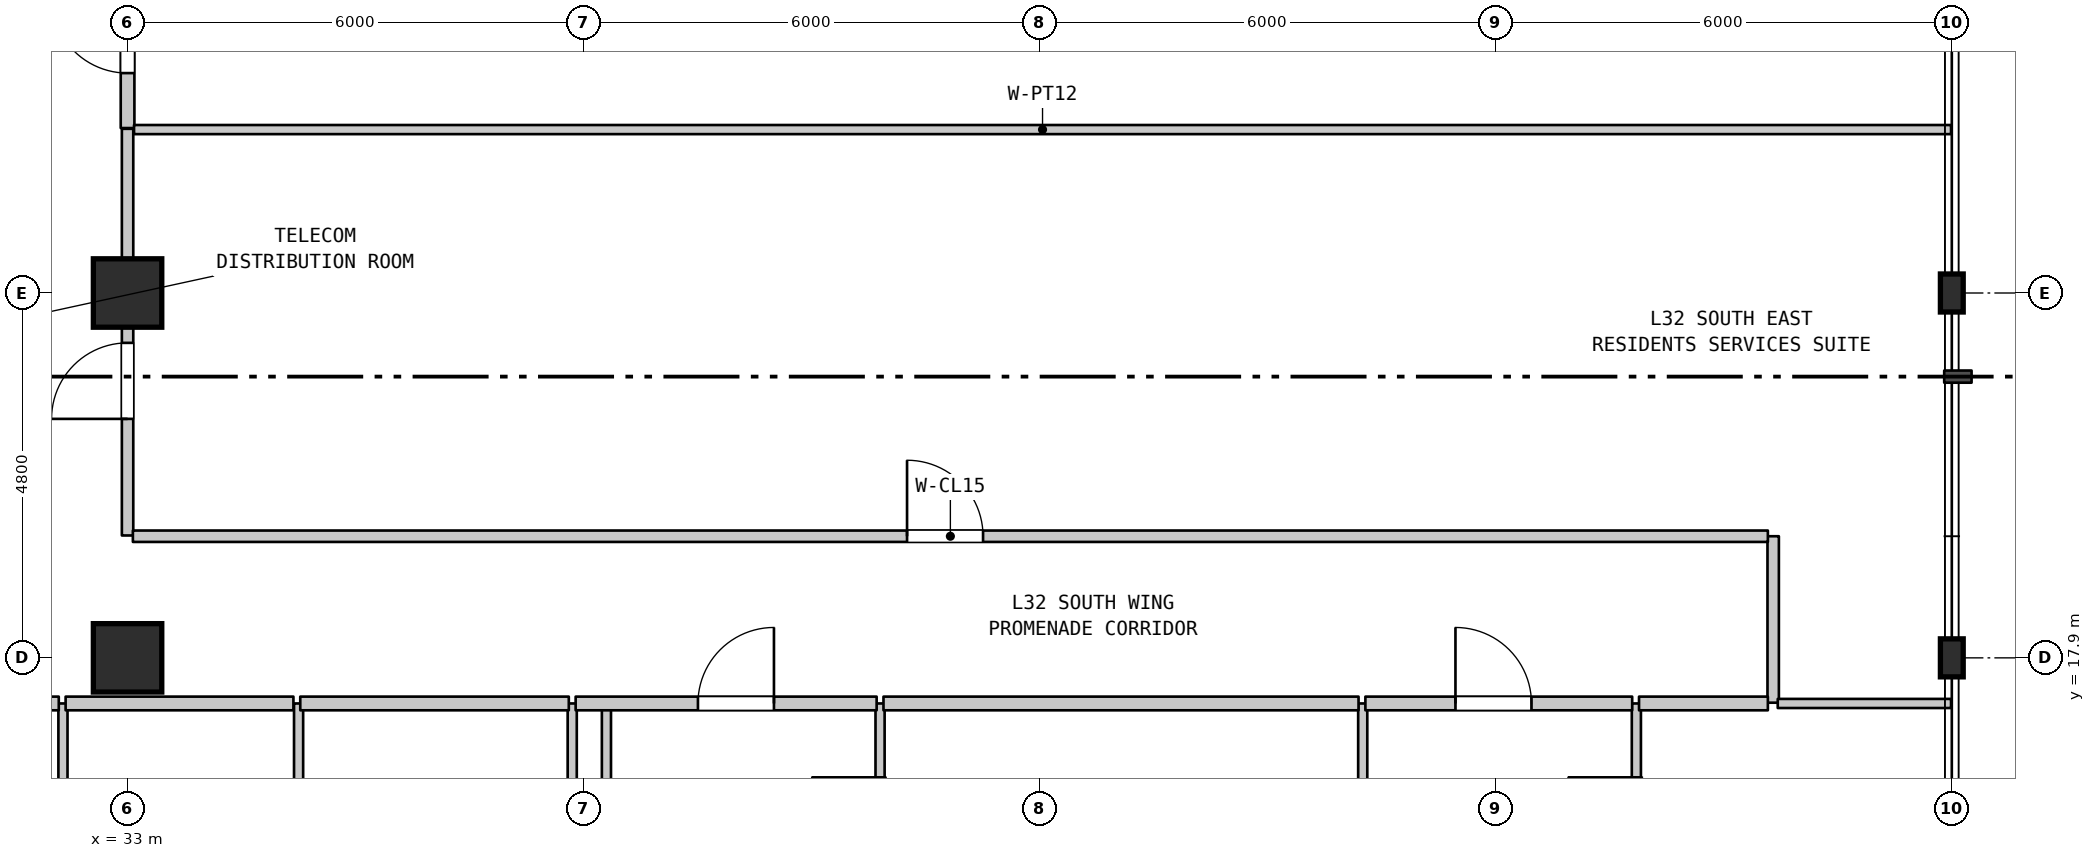
"""IFC4 building model, lengths in metres.
Left out: names, types, materials, properties, quantities, classifications, styles, units other than length and angle.
Written with IfcOpenShell. Run it as: python <this file> out.ifc"""

import sys

from ifc_helpers import new_model, si_unit, direction, frame, frame_2d, origin, origin_2d, place, context, subcontext, project, spatial, rectangle, i_section, extrude, element, fill, save


model = new_model("IFC4")
c1 = context("Model", 3, precision=1e-05, world=origin(), true_north=direction((0.0, 1.0)))
c2 = subcontext(c1, "Body", "Model", "MODEL_VIEW")
j1 = project(units=[si_unit("LENGTHUNIT", "METRE"), si_unit("PLANEANGLEUNIT", "RADIAN")], contexts=[c1])
p1 = place(None, origin())
s1 = spatial("IfcSite", under=j1, at=p1, CompositionType="ELEMENT")
p2 = place(p1, origin())
s2 = spatial("IfcBuilding", under=s1, at=p2, CompositionType="ELEMENT")
p3 = place(p2, frame((0.0, 0.0, 133.5)))
s3 = spatial("IfcBuildingStorey", under=s2, at=p3, CompositionType="ELEMENT", Elevation=133.5)
for number, where, z_axis, x_axis in (
    (1, (33.0, 17.9, 0.0), (0.0, 0.0, 1.0), (1.0, 0.0, 0.0)),
    (2, (33.0, 22.7, 0.0), (0.0, 0.0, 1.0), (1.0, 0.0, 0.0)),
):
    element("IfcColumn", number, at=place(p3, frame(where, z_axis=z_axis, x_axis=x_axis)), inside=s3, PredefinedType="COLUMN", context=c2, shape_type="SweptSolid", body=[
        extrude(rectangle(XDim=0.9, YDim=0.9, at=origin_2d()), origin(), (0.0, 0.0, 1.0), 3.7),
    ])
for number, where, z_axis, x_axis in (
    (3, (57.0, 17.9, 0.0), (0.0, 0.0, 1.0), (1.0, 0.0, 0.0)),
    (4, (57.0, 22.7, 0.0), (0.0, 0.0, 1.0), (1.0, 0.0, 0.0)),
):
    element("IfcColumn", number, at=place(p3, frame(where, z_axis=z_axis, x_axis=x_axis)), inside=s3, PredefinedType="COLUMN", context=c2, shape_type="SweptSolid", body=[
        extrude(i_section(OverallWidth=0.3, OverallDepth=0.5, WebThickness=0.014, FlangeThickness=0.028, FilletRadius=0.027, at=origin_2d()), origin(), (0.0, 0.0, 1.0), 3.7),
    ])
p4 = place(p3, frame((32.15, 11.15, 0.0), z_axis=(0.0, 0.0, 1.0), x_axis=(0.0, 1.0, 0.0)))
e5 = element("IfcWall", 5, at=p4, inside=s3, PredefinedType="PARTITIONING", context=c2, shape_type="SweptSolid", body=[
    extrude(rectangle(XDim=6.15, YDim=0.12, at=frame_2d((3.075, 0.0))), origin(), (0.0, 0.0, 1.0), 3.385),
])
p5 = place(p3, frame((33.0, 19.51, 0.0), z_axis=(0.0, 0.0, 1.0), x_axis=(0.0, 1.0, 0.0)))
e6 = element("IfcWall", 6, at=p5, inside=s3, PredefinedType="STANDARD", context=c2, shape_type="SweptSolid", body=[
    extrude(rectangle(XDim=5.35, YDim=0.15, at=frame_2d((2.675, 0.0))), origin(), (0.0, 0.0, 1.0), 2.935),
])
p6 = place(p5, frame((1.534, 0.0, 0.0)))
e7 = element("IfcOpeningElement", 7, at=p6, cuts=e6, PredefinedType="OPENING", context=c2, shape_type="SweptSolid", body=[
    extrude(rectangle(XDim=1.0, YDim=2.15, at=frame_2d((0.5, 1.075))), frame((0.0, 0.085, 0.0), z_axis=(0.0, -1.0, 0.0), x_axis=(1.0, 0.0, 0.0)), (0.0, 0.0, 1.0), 0.17),
])
p7 = place(p3, frame((33.0, 24.87, 0.0), z_axis=(0.0, 0.0, 1.0), x_axis=(0.0, 1.0, 0.0)))
e8 = element("IfcWall", 8, at=p7, inside=s3, PredefinedType="STANDARD", context=c2, shape_type="SweptSolid", body=[
    extrude(rectangle(XDim=2.6, YDim=0.18, at=frame_2d((1.3, 0.0))), origin(), (0.0, 0.0, 1.0), 2.935),
])
p8 = place(p7, frame((0.723, 0.0, 0.0)))
e9 = element("IfcOpeningElement", 9, at=p8, cuts=e8, PredefinedType="OPENING", context=c2, shape_type="SweptSolid", body=[
    extrude(rectangle(XDim=1.0, YDim=2.15, at=frame_2d((0.5, 1.075))), frame((0.0, 0.1, 0.0), z_axis=(0.0, -1.0, 0.0), x_axis=(1.0, 0.0, 0.0)), (0.0, 0.0, 1.0), 0.2),
])
for number, where, z_axis, x_axis in (
    (10, (35.25, 11.15, 0.0), (0.0, 0.0, 1.0), (0.0, 1.0, 0.0)),
    (11, (38.85, 11.15, 0.0), (0.0, 0.0, 1.0), (0.0, 1.0, 0.0)),
):
    element("IfcWall", number, at=place(p3, frame(where, z_axis=z_axis, x_axis=x_axis)), inside=s3, PredefinedType="PARTITIONING", context=c2, shape_type="SweptSolid", body=[
        extrude(rectangle(XDim=6.15, YDim=0.12, at=frame_2d((3.075, 0.0))), origin(), (0.0, 0.0, 1.0), 3.385),
    ])
p9 = place(p3, frame((39.3, 0.71, 0.0), z_axis=(0.0, 0.0, 1.0), x_axis=(0.0, 1.0, 0.0)))
e12 = element("IfcWall", 12, at=p9, inside=s3, PredefinedType="PARTITIONING", context=c2, shape_type="SweptSolid", body=[
    extrude(rectangle(XDim=16.59, YDim=0.12, at=frame_2d((8.295, 0.0))), origin(), (0.0, 0.0, 1.0), 3.385),
])
p10 = place(p3, frame((42.9, 14.6, 0.0), z_axis=(0.0, 0.0, 1.0), x_axis=(0.0, 1.0, 0.0)))
e13 = element("IfcWall", 13, at=p10, inside=s3, PredefinedType="PARTITIONING", context=c2, shape_type="SweptSolid", body=[
    extrude(rectangle(XDim=2.7, YDim=0.12, at=frame_2d((1.35, 0.0))), origin(), (0.0, 0.0, 1.0), 3.385),
])
p11 = place(p10, frame((0.828, 0.0, 0.0)))
e14 = element("IfcOpeningElement", 14, at=p11, cuts=e13, PredefinedType="OPENING", context=c2, shape_type="SweptSolid", body=[
    extrude(rectangle(XDim=0.9, YDim=2.1, at=frame_2d((0.45, 1.05))), frame((0.0, 0.07, 0.0), z_axis=(0.0, -1.0, 0.0), x_axis=(1.0, 0.0, 0.0)), (0.0, 0.0, 1.0), 0.14),
])
p12 = place(p3, frame((49.25, 14.6, 0.0), z_axis=(0.0, 0.0, 1.0), x_axis=(0.0, 1.0, 0.0)))
e15 = element("IfcWall", 15, at=p12, inside=s3, PredefinedType="PARTITIONING", context=c2, shape_type="SweptSolid", body=[
    extrude(rectangle(XDim=2.7, YDim=0.12, at=frame_2d((1.35, 0.0))), origin(), (0.0, 0.0, 1.0), 3.385),
])
p13 = place(p3, frame((52.85, 14.6, 0.0), z_axis=(0.0, 0.0, 1.0), x_axis=(0.0, 1.0, 0.0)))
e16 = element("IfcWall", 16, at=p13, inside=s3, PredefinedType="PARTITIONING", context=c2, shape_type="SweptSolid", body=[
    extrude(rectangle(XDim=2.7, YDim=0.12, at=frame_2d((1.35, 0.0))), origin(), (0.0, 0.0, 1.0), 3.385),
])
p14 = place(p13, frame((0.828, 0.0, 0.0)))
e17 = element("IfcOpeningElement", 17, at=p14, cuts=e16, PredefinedType="OPENING", context=c2, shape_type="SweptSolid", body=[
    extrude(rectangle(XDim=0.9, YDim=2.1, at=frame_2d((0.45, 1.05))), frame((0.0, 0.07, 0.0), z_axis=(0.0, -1.0, 0.0), x_axis=(1.0, 0.0, 0.0)), (0.0, 0.0, 1.0), 0.14),
])
p15 = place(p3, frame((54.65, 17.31, 0.0), z_axis=(0.0, 0.0, 1.0), x_axis=(0.0, 1.0, 0.0)))
e18 = element("IfcWall", 18, at=p15, inside=s3, PredefinedType="STANDARD", context=c2, shape_type="SweptSolid", body=[
    extrude(rectangle(XDim=2.19, YDim=0.15, at=frame_2d((1.095, 0.0))), origin(), (0.0, 0.0, 1.0), 3.385),
])
p16 = place(p3, frame((27.645, 17.3, 0.0), z_axis=(0.0, 0.0, 1.0), x_axis=(1.0, 0.0, 0.0)))
e19 = element("IfcWall", 19, at=p16, inside=s3, PredefinedType="STANDARD", context=c2, shape_type="SweptSolid", body=[
    extrude(rectangle(XDim=4.45, YDim=0.18, at=frame_2d((2.225, 0.0))), origin(), (0.0, 0.0, 1.0), 3.385),
])
p17 = place(p16, frame((1.653, 0.0, 0.0)))
e20 = element("IfcOpeningElement", 20, at=p17, cuts=e19, PredefinedType="OPENING", context=c2, shape_type="SweptSolid", body=[
    extrude(rectangle(XDim=1.0, YDim=2.15, at=frame_2d((0.5, 1.075))), frame((0.0, 0.1, 0.0), z_axis=(0.0, -1.0, 0.0), x_axis=(1.0, 0.0, 0.0)), (0.0, 0.0, 1.0), 0.2),
])
p18 = place(p3, frame((32.185, 17.3, 0.0), z_axis=(0.0, 0.0, 1.0), x_axis=(1.0, 0.0, 0.0)))
e21 = element("IfcWall", 21, at=p18, inside=s3, PredefinedType="STANDARD", context=c2, shape_type="SweptSolid", body=[
    extrude(rectangle(XDim=2.997, YDim=0.18, at=frame_2d((1.499, 0.0))), origin(), (0.0, 0.0, 1.0), 3.385),
])
p19 = place(p3, frame((35.272, 17.3, 0.0), z_axis=(0.0, 0.0, 1.0), x_axis=(1.0, 0.0, 0.0)))
e22 = element("IfcWall", 22, at=p19, inside=s3, PredefinedType="STANDARD", context=c2, shape_type="SweptSolid", body=[
    extrude(rectangle(XDim=3.533, YDim=0.18, at=frame_2d((1.767, 0.0))), origin(), (0.0, 0.0, 1.0), 3.385),
])
p20 = place(p3, frame((38.895, 17.3, 0.0), z_axis=(0.0, 0.0, 1.0), x_axis=(1.0, 0.0, 0.0)))
e23 = element("IfcWall", 23, at=p20, inside=s3, PredefinedType="STANDARD", context=c2, shape_type="SweptSolid", body=[
    extrude(rectangle(XDim=3.96, YDim=0.18, at=frame_2d((1.98, 0.0))), origin(), (0.0, 0.0, 1.0), 3.385),
])
p21 = place(p20, frame((1.609, 0.0, 0.0)))
e24 = element("IfcOpeningElement", 24, at=p21, cuts=e23, PredefinedType="OPENING", context=c2, shape_type="SweptSolid", body=[
    extrude(rectangle(XDim=1.0, YDim=2.15, at=frame_2d((0.5, 1.075))), frame((0.0, 0.1, 0.0), z_axis=(0.0, -1.0, 0.0), x_axis=(1.0, 0.0, 0.0)), (0.0, 0.0, 1.0), 0.2),
])
p22 = place(p3, frame((42.945, 17.3, 0.0), z_axis=(0.0, 0.0, 1.0), x_axis=(1.0, 0.0, 0.0)))
e25 = element("IfcWall", 25, at=p22, inside=s3, PredefinedType="STANDARD", context=c2, shape_type="SweptSolid", body=[
    extrude(rectangle(XDim=6.25, YDim=0.18, at=frame_2d((3.125, 0.0))), origin(), (0.0, 0.0, 1.0), 3.385),
])
p23 = place(p3, frame((49.285, 17.3, 0.0), z_axis=(0.0, 0.0, 1.0), x_axis=(1.0, 0.0, 0.0)))
e26 = element("IfcWall", 26, at=p23, inside=s3, PredefinedType="STANDARD", context=c2, shape_type="SweptSolid", body=[
    extrude(rectangle(XDim=3.51, YDim=0.18, at=frame_2d((1.755, 0.0))), origin(), (0.0, 0.0, 1.0), 3.385),
])
p24 = place(p23, frame((1.185, 0.0, 0.0)))
e27 = element("IfcOpeningElement", 27, at=p24, cuts=e26, PredefinedType="OPENING", context=c2, shape_type="SweptSolid", body=[
    extrude(rectangle(XDim=1.0, YDim=2.15, at=frame_2d((0.5, 1.075))), frame((0.0, 0.1, 0.0), z_axis=(0.0, -1.0, 0.0), x_axis=(1.0, 0.0, 0.0)), (0.0, 0.0, 1.0), 0.2),
])
p25 = place(p3, frame((52.885, 17.3, 0.0), z_axis=(0.0, 0.0, 1.0), x_axis=(1.0, 0.0, 0.0)))
e28 = element("IfcWall", 28, at=p25, inside=s3, PredefinedType="STANDARD", context=c2, shape_type="SweptSolid", body=[
    extrude(rectangle(XDim=1.695, YDim=0.18, at=frame_2d((0.848, 0.0))), origin(), (0.0, 0.0, 1.0), 3.385),
])
p26 = place(p3, frame((54.71, 17.3, 0.0), z_axis=(0.0, 0.0, 1.0), x_axis=(1.0, 0.0, 0.0)))
e29 = element("IfcWall", 29, at=p26, inside=s3, PredefinedType="PARTITIONING", context=c2, shape_type="SweptSolid", body=[
    extrude(rectangle(XDim=2.28, YDim=0.12, at=frame_2d((1.14, 0.0))), origin(), (0.0, 0.0, 1.0), 3.385),
])
p27 = place(p3, frame((33.07, 19.5, 0.0), z_axis=(0.0, 0.0, 1.0), x_axis=(1.0, 0.0, 0.0)))
e30 = element("IfcWall", 30, at=p27, inside=s3, PredefinedType="STANDARD", context=c2, shape_type="SweptSolid", body=[
    extrude(rectangle(XDim=21.51, YDim=0.15, at=frame_2d((10.755, 0.0))), origin(), (0.0, 0.0, 1.0), 3.385),
])
p28 = place(p27, frame((10.185, 0.0, 0.0)))
e31 = element("IfcOpeningElement", 31, at=p28, cuts=e30, PredefinedType="OPENING", context=c2, shape_type="SweptSolid", body=[
    extrude(rectangle(XDim=1.0, YDim=2.15, at=frame_2d((0.5, 1.075))), frame((0.0, 0.085, 0.0), z_axis=(0.0, -1.0, 0.0), x_axis=(1.0, 0.0, 0.0)), (0.0, 0.0, 1.0), 0.17),
])
p29 = place(p3, frame((33.085, 24.85, 0.0), z_axis=(0.0, 0.0, 1.0), x_axis=(1.0, 0.0, 0.0)))
e32 = element("IfcWall", 32, at=p29, inside=s3, PredefinedType="PARTITIONING", context=c2, shape_type="SweptSolid", body=[
    extrude(rectangle(XDim=23.905, YDim=0.12, at=frame_2d((11.953, 0.0))), origin(), (0.0, 0.0, 1.0), 3.385),
])
p30 = place(p6, origin())
e33 = element("IfcDoor", 33, at=p30, inside=s3, OperationType="SINGLE_SWING_LEFT", PredefinedType="DOOR", context=c2, shape_type="SweptSolid", body=[
    extrude(rectangle(XDim=1.0, YDim=2.15, at=frame_2d((0.5, 1.075))), frame((0.0, 0.025, 0.0), z_axis=(0.0, -1.0, 0.0), x_axis=(1.0, 0.0, 0.0)), (0.0, 0.0, 1.0), 0.05),
])
fill(e7, e33)
p31 = place(p8, origin())
e34 = element("IfcDoor", 34, at=p31, inside=s3, OperationType="SINGLE_SWING_RIGHT", PredefinedType="DOOR", context=c2, shape_type="SweptSolid", body=[
    extrude(rectangle(XDim=1.0, YDim=2.15, at=frame_2d((0.5, 1.075))), frame((0.0, 0.025, 0.0), z_axis=(0.0, -1.0, 0.0), x_axis=(1.0, 0.0, 0.0)), (0.0, 0.0, 1.0), 0.05),
])
fill(e9, e34)
p32 = place(p11, origin())
e35 = element("IfcDoor", 35, at=p32, inside=s3, OperationType="SINGLE_SWING_RIGHT", PredefinedType="DOOR", context=c2, shape_type="SweptSolid", body=[
    extrude(rectangle(XDim=0.9, YDim=2.1, at=frame_2d((0.45, 1.05))), frame((0.0, 0.025, 0.0), z_axis=(0.0, -1.0, 0.0), x_axis=(1.0, 0.0, 0.0)), (0.0, 0.0, 1.0), 0.05),
])
fill(e14, e35)
p33 = place(p14, origin())
e36 = element("IfcDoor", 36, at=p33, inside=s3, OperationType="SINGLE_SWING_RIGHT", PredefinedType="DOOR", context=c2, shape_type="SweptSolid", body=[
    extrude(rectangle(XDim=0.9, YDim=2.1, at=frame_2d((0.45, 1.05))), frame((0.0, 0.025, 0.0), z_axis=(0.0, -1.0, 0.0), x_axis=(1.0, 0.0, 0.0)), (0.0, 0.0, 1.0), 0.05),
])
fill(e17, e36)
p34 = place(p21, origin())
e37 = element("IfcDoor", 37, at=p34, inside=s3, OperationType="SINGLE_SWING_RIGHT", PredefinedType="DOOR", context=c2, shape_type="SweptSolid", body=[
    extrude(rectangle(XDim=1.0, YDim=2.15, at=frame_2d((0.5, 1.075))), frame((0.0, 0.025, 0.0), z_axis=(0.0, -1.0, 0.0), x_axis=(1.0, 0.0, 0.0)), (0.0, 0.0, 1.0), 0.05),
])
fill(e24, e37)
p35 = place(p24, origin())
e38 = element("IfcDoor", 38, at=p35, inside=s3, OperationType="SINGLE_SWING_LEFT", PredefinedType="DOOR", context=c2, shape_type="SweptSolid", body=[
    extrude(rectangle(XDim=1.0, YDim=2.15, at=frame_2d((0.5, 1.075))), frame((0.0, 0.025, 0.0), z_axis=(0.0, -1.0, 0.0), x_axis=(1.0, 0.0, 0.0)), (0.0, 0.0, 1.0), 0.05),
])
fill(e27, e38)
p36 = place(p28, origin())
e39 = element("IfcDoor", 39, at=p36, inside=s3, OperationType="SINGLE_SWING_LEFT", PredefinedType="DOOR", context=c2, shape_type="SweptSolid", body=[
    extrude(rectangle(XDim=1.0, YDim=2.15, at=frame_2d((0.5, 1.075))), frame((0.0, 0.025, 0.0), z_axis=(0.0, -1.0, 0.0), x_axis=(1.0, 0.0, 0.0)), (0.0, 0.0, 1.0), 0.05),
])
fill(e31, e39)
save(model, sys.argv[1])
